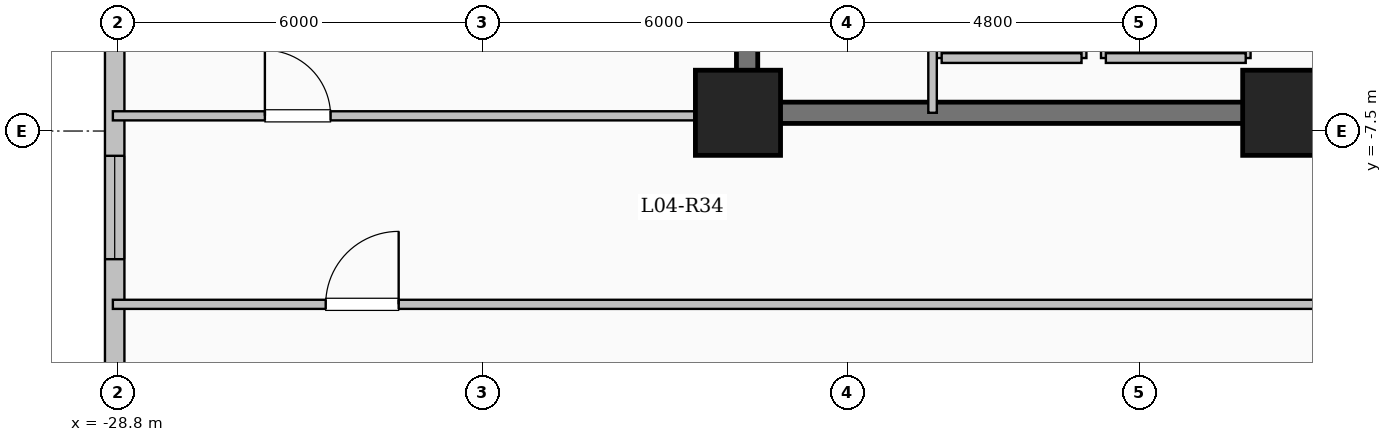
"""IFC4 building model, lengths in metres.
Left out: names, types, materials, properties, quantities, classifications, styles, units other than length and angle.
Written with IfcOpenShell. Run it as: python <this file> out.ifc"""

import sys

from ifc_helpers import new_model, si_unit, direction, frame, frame_2d, origin, origin_2d, place, context, subcontext, project, spatial, rectangle, extrude, element, fill, save


model = new_model("IFC4")
c1 = context("Model", 3, precision=1e-05, world=origin(), true_north=direction((0.0, 1.0)))
c2 = subcontext(c1, "Body", "Model", "MODEL_VIEW")
j1 = project(units=[si_unit("LENGTHUNIT", "METRE"), si_unit("PLANEANGLEUNIT", "RADIAN")], contexts=[c1])
p1 = place(None, origin())
s1 = spatial("IfcSite", under=j1, at=p1, CompositionType="ELEMENT")
p2 = place(p1, origin())
s2 = spatial("IfcBuilding", under=s1, at=p2, CompositionType="ELEMENT")
p3 = place(p2, frame((0.0, 0.0, 18.9)))
s3 = spatial("IfcBuildingStorey", under=s2, at=p3, CompositionType="ELEMENT", Elevation=18.9)
for number, where, z_axis, x_axis in (
    (1, (-9.6, -7.2, 0.0), (0.0, 0.0, 1.0), (1.0, 0.0, 0.0)),
    (2, (-18.6, -7.2, 0.0), (0.0, 0.0, 1.0), (1.0, 0.0, 0.0)),
):
    element("IfcColumn", number, at=place(p3, frame(where, z_axis=z_axis, x_axis=x_axis)), inside=s3, PredefinedType="COLUMN", context=c2, shape_type="SweptSolid", body=[
        extrude(rectangle(XDim=1.4, YDim=1.4, at=origin_2d()), origin(), (0.0, 0.0, 1.0), 5.1),
    ])
p4 = place(p3, frame((-28.85, -26.25, 0.0), z_axis=(0.0, 0.0, 1.0), x_axis=(0.0, 1.0, 0.0)))
e3 = element("IfcWall", 3, at=p4, inside=s3, PredefinedType="SOLIDWALL", context=c2, shape_type="SweptSolid", body=[
    extrude(rectangle(XDim=52.5, YDim=0.32, at=frame_2d((26.25, 0.0))), origin(), (0.0, 0.0, 1.0), 4.85),
])
p5 = place(p4, frame((6.85, 0.0, 0.9)))
e4 = element("IfcOpeningElement", 4, at=p5, cuts=e3, PredefinedType="OPENING", context=c2, shape_type="SweptSolid", body=[
    extrude(rectangle(XDim=2.1, YDim=2.0, at=frame_2d((1.05, 1.0))), frame((0.0, 0.17, 0.0), z_axis=(0.0, -1.0, 0.0), x_axis=(1.0, 0.0, 0.0)), (0.0, 0.0, 1.0), 0.34),
])
p6 = place(p4, frame((16.643, 0.0, 0.9)))
e5 = element("IfcOpeningElement", 5, at=p6, cuts=e3, PredefinedType="OPENING", context=c2, shape_type="SweptSolid", body=[
    extrude(rectangle(XDim=1.7, YDim=1.9, at=frame_2d((0.85, 0.95))), frame((0.0, 0.17, 0.0), z_axis=(0.0, -1.0, 0.0), x_axis=(1.0, 0.0, 0.0)), (0.0, 0.0, 1.0), 0.34),
])
p7 = place(p4, frame((26.95, 0.0, 0.9)))
e6 = element("IfcOpeningElement", 6, at=p7, cuts=e3, PredefinedType="OPENING", context=c2, shape_type="SweptSolid", body=[
    extrude(rectangle(XDim=2.1, YDim=2.0, at=frame_2d((1.05, 1.0))), frame((0.0, 0.17, 0.0), z_axis=(0.0, -1.0, 0.0), x_axis=(1.0, 0.0, 0.0)), (0.0, 0.0, 1.0), 0.34),
])
p8 = place(p4, frame((37.375, 0.0, 0.95)))
e7 = element("IfcOpeningElement", 7, at=p8, cuts=e3, PredefinedType="OPENING", context=c2, shape_type="SweptSolid", body=[
    extrude(rectangle(XDim=1.0, YDim=1.5, at=frame_2d((0.5, 0.75))), frame((0.0, 0.17, 0.0), z_axis=(0.0, -1.0, 0.0), x_axis=(1.0, 0.0, 0.0)), (0.0, 0.0, 1.0), 0.34),
])
p9 = place(p4, frame((44.6, 0.0, 0.9)))
e8 = element("IfcOpeningElement", 8, at=p9, cuts=e3, PredefinedType="OPENING", context=c2, shape_type="SweptSolid", body=[
    extrude(rectangle(XDim=2.1, YDim=2.0, at=frame_2d((1.05, 1.0))), frame((0.0, 0.17, 0.0), z_axis=(0.0, -1.0, 0.0), x_axis=(1.0, 0.0, 0.0)), (0.0, 0.0, 1.0), 0.34),
])
p10 = place(p3, frame((-12.55, -6.3, 0.0), z_axis=(0.0, 0.0, 1.0), x_axis=(0.0, 1.0, 0.0)))
e9 = element("IfcWall", 9, at=p10, inside=s3, PredefinedType="SOLIDWALL", context=c2, shape_type="SweptSolid", body=[
    extrude(rectangle(XDim=2.6, YDim=0.16, at=frame_2d((1.3, 0.0))), origin(), (0.0, 0.0, 1.0), 4.85),
])
p11 = place(p3, frame((-10.25, -6.3, 0.0), z_axis=(0.0, 0.0, 1.0), x_axis=(0.0, 1.0, 0.0)))
e10 = element("IfcWall", 10, at=p11, inside=s3, PredefinedType="SOLIDWALL", context=c2, shape_type="SweptSolid", body=[
    extrude(rectangle(XDim=2.6, YDim=0.16, at=frame_2d((1.3, 0.0))), origin(), (0.0, 0.0, 1.0), 4.85),
])
p12 = place(p11, frame((0.75, 0.0, 0.0)))
e11 = element("IfcOpeningElement", 11, at=p12, cuts=e10, PredefinedType="OPENING", context=c2, shape_type="SweptSolid", body=[
    extrude(rectangle(XDim=1.1, YDim=2.15, at=frame_2d((0.55, 1.075))), frame((0.0, 0.09, 0.0), z_axis=(0.0, -1.0, 0.0), x_axis=(1.0, 0.0, 0.0)), (0.0, 0.0, 1.0), 0.18),
])
p13 = place(p3, frame((-12.55, -6.3, 0.0), z_axis=(0.0, 0.0, 1.0), x_axis=(1.0, 0.0, 0.0)))
e12 = element("IfcWall", 12, at=p13, inside=s3, PredefinedType="SOLIDWALL", context=c2, shape_type="SweptSolid", body=[
    extrude(rectangle(XDim=2.3, YDim=0.16, at=frame_2d((1.15, 0.0))), origin(), (0.0, 0.0, 1.0), 4.85),
])
for number, where, z_axis, x_axis in (
    (13, (-15.25, -6.3, 0.0), (0.0, 0.0, 1.0), (0.0, 1.0, 0.0)),
    (14, (-12.95, -6.3, 0.0), (0.0, 0.0, 1.0), (0.0, 1.0, 0.0)),
):
    element("IfcWall", number, at=place(p3, frame(where, z_axis=z_axis, x_axis=x_axis)), inside=s3, PredefinedType="SOLIDWALL", context=c2, shape_type="SweptSolid", body=[
        extrude(rectangle(XDim=2.6, YDim=0.16, at=frame_2d((1.3, 0.0))), origin(), (0.0, 0.0, 1.0), 4.85),
    ])
p14 = place(p3, frame((-15.25, -6.3, 0.0), z_axis=(0.0, 0.0, 1.0), x_axis=(1.0, 0.0, 0.0)))
e15 = element("IfcWall", 15, at=p14, inside=s3, PredefinedType="SOLIDWALL", context=c2, shape_type="SweptSolid", body=[
    extrude(rectangle(XDim=2.3, YDim=0.16, at=frame_2d((1.15, 0.0))), origin(), (0.0, 0.0, 1.0), 4.85),
])
p15 = place(p3, frame((-18.45, -7.375, 0.0), z_axis=(0.0, 0.0, 1.0), x_axis=(0.0, 1.0, 0.0)))
e16 = element("IfcWall", 16, at=p15, inside=s3, PredefinedType="SHEAR", context=c2, shape_type="SweptSolid", body=[
    extrude(rectangle(XDim=14.05, YDim=0.35, at=frame_2d((7.025, 0.0))), origin(), (0.0, 0.0, 1.0), 5.1),
])
p16 = place(p3, frame((-18.625, -7.2, 0.0), z_axis=(0.0, 0.0, 1.0), x_axis=(1.0, 0.0, 0.0)))
e17 = element("IfcWall", 17, at=p16, inside=s3, PredefinedType="SHEAR", context=c2, shape_type="SweptSolid", body=[
    extrude(rectangle(XDim=8.55, YDim=0.35, at=frame_2d((4.275, 0.0))), origin(), (0.0, 0.0, 1.0), 5.1),
])
p17 = place(p3, frame((-15.4, -7.2, 0.0), z_axis=(0.0, 0.0, 1.0), x_axis=(0.0, 1.0, 0.0)))
e18 = element("IfcWall", 18, at=p17, inside=s3, PredefinedType="PARTITIONING", context=c2, shape_type="SweptSolid", body=[
    extrude(rectangle(XDim=10.45, YDim=0.14, at=frame_2d((5.225, 0.0))), origin(), (0.0, 0.0, 1.0), 4.85),
])
p18 = place(p17, frame((9.25, 0.0, 0.0)))
e19 = element("IfcOpeningElement", 19, at=p18, cuts=e18, PredefinedType="OPENING", context=c2, shape_type="SweptSolid", body=[
    extrude(rectangle(XDim=0.9, YDim=2.08, at=frame_2d((0.45, 1.04))), frame((0.0, 0.08, 0.0), z_axis=(0.0, -1.0, 0.0), x_axis=(1.0, 0.0, 0.0)), (0.0, 0.0, 1.0), 0.16),
])
p19 = place(p3, frame((-28.88, -10.35, 0.0), z_axis=(0.0, 0.0, 1.0), x_axis=(1.0, 0.0, 0.0)))
e20 = element("IfcWall", 20, at=p19, inside=s3, PredefinedType="PARTITIONING", context=c2, shape_type="SweptSolid", body=[
    extrude(rectangle(XDim=20.33, YDim=0.15, at=frame_2d((10.165, 0.0))), origin(), (0.0, 0.0, 1.0), 4.85),
])
p20 = place(p19, frame((3.5, 0.0, 0.0)))
e21 = element("IfcOpeningElement", 21, at=p20, cuts=e20, PredefinedType="OPENING", context=c2, shape_type="SweptSolid", body=[
    extrude(rectangle(XDim=1.2, YDim=2.15, at=frame_2d((0.6, 1.075))), frame((0.0, 0.085, 0.0), z_axis=(0.0, -1.0, 0.0), x_axis=(1.0, 0.0, 0.0)), (0.0, 0.0, 1.0), 0.17),
])
p21 = place(p3, frame((-28.88, -7.25, 0.0), z_axis=(0.0, 0.0, 1.0), x_axis=(1.0, 0.0, 0.0)))
e22 = element("IfcWall", 22, at=p21, inside=s3, PredefinedType="PARTITIONING", context=c2, shape_type="SweptSolid", body=[
    extrude(rectangle(XDim=10.43, YDim=0.15, at=frame_2d((5.215, 0.0))), origin(), (0.0, 0.0, 1.0), 4.85),
])
p22 = place(p21, frame((2.5, 0.0, 0.0)))
e23 = element("IfcOpeningElement", 23, at=p22, cuts=e22, PredefinedType="OPENING", context=c2, shape_type="SweptSolid", body=[
    extrude(rectangle(XDim=1.08, YDim=2.15, at=frame_2d((0.54, 1.075))), frame((0.0, 0.085, 0.0), z_axis=(0.0, -1.0, 0.0), x_axis=(1.0, 0.0, 0.0)), (0.0, 0.0, 1.0), 0.17),
])
p23 = place(p6, origin())
e24 = element("IfcWindow", 24, at=p23, inside=s3, PartitioningType="SINGLE_PANEL", PredefinedType="WINDOW", context=c2, shape_type="SweptSolid", body=[
    extrude(rectangle(XDim=1.7, YDim=1.9, at=frame_2d((0.85, 0.95))), frame((0.0, 0.03, 0.0), z_axis=(0.0, -1.0, 0.0), x_axis=(1.0, 0.0, 0.0)), (0.0, 0.0, 1.0), 0.06),
])
fill(e5, e24)
p24 = place(p20, origin())
e25 = element("IfcDoor", 25, at=p24, inside=s3, OperationType="SINGLE_SWING_RIGHT", PredefinedType="DOOR", context=c2, shape_type="SweptSolid", body=[
    extrude(rectangle(XDim=1.2, YDim=2.15, at=frame_2d((0.6, 1.075))), frame((0.0, 0.025, 0.0), z_axis=(0.0, -1.0, 0.0), x_axis=(1.0, 0.0, 0.0)), (0.0, 0.0, 1.0), 0.05),
])
fill(e21, e25)
p25 = place(p22, origin())
e26 = element("IfcDoor", 26, at=p25, inside=s3, OperationType="SINGLE_SWING_LEFT", PredefinedType="DOOR", context=c2, shape_type="SweptSolid", body=[
    extrude(rectangle(XDim=1.08, YDim=2.15, at=frame_2d((0.54, 1.075))), frame((0.0, 0.025, 0.0), z_axis=(0.0, -1.0, 0.0), x_axis=(1.0, 0.0, 0.0)), (0.0, 0.0, 1.0), 0.05),
])
fill(e23, e26)
save(model, sys.argv[1])
